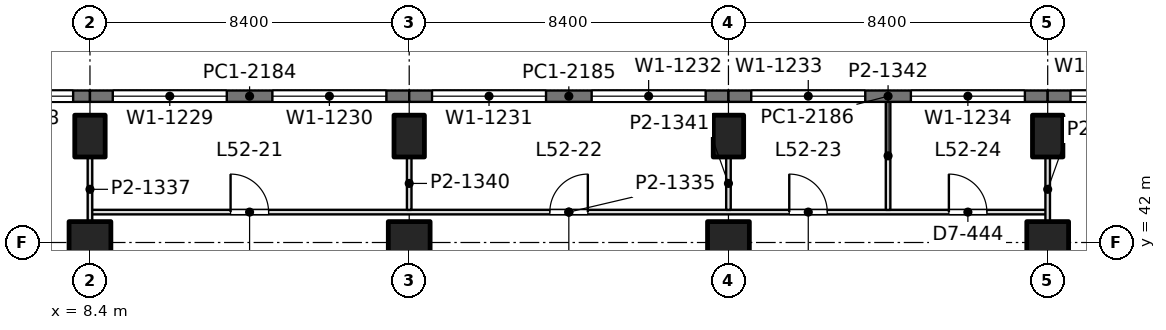
"""IFC4 building model, lengths in metres.
Left out: names, types, materials, properties, quantities, classifications, styles, units other than length and angle.
Written with IfcOpenShell. Run it as: python <this file> out.ifc"""

import sys

from ifc_helpers import new_model, si_unit, direction, frame, frame_2d, origin, origin_2d, place, context, subcontext, project, spatial, rectangle, extrude, element, fill, save


model = new_model("IFC4")
c1 = context("Model", 3, precision=1e-05, world=origin(), true_north=direction((0.0, 1.0)))
c2 = subcontext(c1, "Body", "Model", "MODEL_VIEW")
j1 = project(units=[si_unit("LENGTHUNIT", "METRE"), si_unit("PLANEANGLEUNIT", "RADIAN")], contexts=[c1])
p1 = place(None, origin())
s1 = spatial("IfcSite", under=j1, at=p1, CompositionType="ELEMENT")
p2 = place(p1, origin())
s2 = spatial("IfcBuilding", under=s1, at=p2, CompositionType="ELEMENT")
p3 = place(p2, frame((0.0, 0.0, 228.0)))
s3 = spatial("IfcBuildingStorey", under=s2, at=p3, CompositionType="ELEMENT", Elevation=228.0)
p4 = place(p3, frame((8.4, 42.0, 0.0), z_axis=(0.0, 0.0, 1.0), x_axis=(1.0, 0.0, 0.0)))
e1 = element("IfcColumn", 1, at=p4, inside=s3, PredefinedType="COLUMN", context=c2, shape_type="SweptSolid", body=[
    extrude(rectangle(XDim=1.1, YDim=1.1, at=origin_2d()), origin(), (0.0, 0.0, 1.0), 4.2),
])
p5 = place(p3, frame((8.4, 44.8, 0.0), z_axis=(0.0, 0.0, 1.0), x_axis=(1.0, 0.0, 0.0)))
e2 = element("IfcColumn", 2, at=p5, inside=s3, PredefinedType="COLUMN", context=c2, shape_type="SweptSolid", body=[
    extrude(rectangle(XDim=0.8, YDim=1.1, at=origin_2d()), origin(), (0.0, 0.0, 1.0), 4.2),
])
p6 = place(p3, frame((16.8, 42.0, 0.0), z_axis=(0.0, 0.0, 1.0), x_axis=(1.0, 0.0, 0.0)))
e3 = element("IfcColumn", 3, at=p6, inside=s3, PredefinedType="COLUMN", context=c2, shape_type="SweptSolid", body=[
    extrude(rectangle(XDim=1.1, YDim=1.1, at=origin_2d()), origin(), (0.0, 0.0, 1.0), 4.2),
])
p7 = place(p3, frame((16.8, 44.8, 0.0), z_axis=(0.0, 0.0, 1.0), x_axis=(1.0, 0.0, 0.0)))
e4 = element("IfcColumn", 4, at=p7, inside=s3, PredefinedType="COLUMN", context=c2, shape_type="SweptSolid", body=[
    extrude(rectangle(XDim=0.8, YDim=1.1, at=origin_2d()), origin(), (0.0, 0.0, 1.0), 4.2),
])
p8 = place(p3, frame((25.2, 42.0, 0.0), z_axis=(0.0, 0.0, 1.0), x_axis=(1.0, 0.0, 0.0)))
e5 = element("IfcColumn", 5, at=p8, inside=s3, PredefinedType="COLUMN", context=c2, shape_type="SweptSolid", body=[
    extrude(rectangle(XDim=1.1, YDim=1.1, at=origin_2d()), origin(), (0.0, 0.0, 1.0), 4.2),
])
p9 = place(p3, frame((25.2, 44.8, 0.0), z_axis=(0.0, 0.0, 1.0), x_axis=(1.0, 0.0, 0.0)))
e6 = element("IfcColumn", 6, at=p9, inside=s3, PredefinedType="COLUMN", context=c2, shape_type="SweptSolid", body=[
    extrude(rectangle(XDim=0.8, YDim=1.1, at=origin_2d()), origin(), (0.0, 0.0, 1.0), 4.2),
])
p10 = place(p3, frame((33.6, 42.0, 0.0), z_axis=(0.0, 0.0, 1.0), x_axis=(1.0, 0.0, 0.0)))
e7 = element("IfcColumn", 7, at=p10, inside=s3, PredefinedType="COLUMN", context=c2, shape_type="SweptSolid", body=[
    extrude(rectangle(XDim=1.1, YDim=1.1, at=origin_2d()), origin(), (0.0, 0.0, 1.0), 4.2),
])
p11 = place(p3, frame((33.6, 44.8, 0.0), z_axis=(0.0, 0.0, 1.0), x_axis=(1.0, 0.0, 0.0)))
e8 = element("IfcColumn", 8, at=p11, inside=s3, PredefinedType="COLUMN", context=c2, shape_type="SweptSolid", body=[
    extrude(rectangle(XDim=0.8, YDim=1.1, at=origin_2d()), origin(), (0.0, 0.0, 1.0), 4.2),
])
p12 = place(p3, frame((0.315, 45.85, 0.0), z_axis=(0.0, 0.0, 1.0), x_axis=(1.0, 0.0, 0.0)))
e9 = element("IfcWall", 9, at=p12, inside=s3, PredefinedType="SOLIDWALL", context=c2, shape_type="SweptSolid", body=[
    extrude(rectangle(XDim=8.085, YDim=0.3, at=frame_2d((4.042, 0.0))), origin(), (0.0, 0.0, 1.0), 4.05),
])
p13 = place(p12, frame((0.443, 0.0, 0.9)))
e10 = element("IfcOpeningElement", 10, at=p13, cuts=e9, PredefinedType="OPENING", context=c2, shape_type="SweptSolid", body=[
    extrude(rectangle(XDim=3.0, YDim=1.9, at=frame_2d((1.5, 0.95))), frame((0.0, 0.16, 0.0), z_axis=(0.0, -1.0, 0.0), x_axis=(1.0, 0.0, 0.0)), (0.0, 0.0, 1.0), 0.32),
])
p14 = place(p12, frame((4.643, 0.0, 0.9)))
e11 = element("IfcOpeningElement", 11, at=p14, cuts=e9, PredefinedType="OPENING", context=c2, shape_type="SweptSolid", body=[
    extrude(rectangle(XDim=3.0, YDim=1.9, at=frame_2d((1.5, 0.95))), frame((0.0, 0.16, 0.0), z_axis=(0.0, -1.0, 0.0), x_axis=(1.0, 0.0, 0.0)), (0.0, 0.0, 1.0), 0.32),
])
p15 = place(p3, frame((8.4, 45.85, 0.0), z_axis=(0.0, 0.0, 1.0), x_axis=(1.0, 0.0, 0.0)))
e12 = element("IfcWall", 12, at=p15, inside=s3, PredefinedType="SOLIDWALL", context=c2, shape_type="SweptSolid", body=[
    extrude(rectangle(XDim=8.4, YDim=0.3, at=frame_2d((4.2, 0.0))), origin(), (0.0, 0.0, 1.0), 4.05),
])
p16 = place(p15, frame((0.6, 0.0, 0.9)))
e13 = element("IfcOpeningElement", 13, at=p16, cuts=e12, PredefinedType="OPENING", context=c2, shape_type="SweptSolid", body=[
    extrude(rectangle(XDim=3.0, YDim=1.9, at=frame_2d((1.5, 0.95))), frame((0.0, 0.16, 0.0), z_axis=(0.0, -1.0, 0.0), x_axis=(1.0, 0.0, 0.0)), (0.0, 0.0, 1.0), 0.32),
])
p17 = place(p15, frame((4.8, 0.0, 0.9)))
e14 = element("IfcOpeningElement", 14, at=p17, cuts=e12, PredefinedType="OPENING", context=c2, shape_type="SweptSolid", body=[
    extrude(rectangle(XDim=3.0, YDim=1.9, at=frame_2d((1.5, 0.95))), frame((0.0, 0.16, 0.0), z_axis=(0.0, -1.0, 0.0), x_axis=(1.0, 0.0, 0.0)), (0.0, 0.0, 1.0), 0.32),
])
p18 = place(p3, frame((16.8, 45.85, 0.0), z_axis=(0.0, 0.0, 1.0), x_axis=(1.0, 0.0, 0.0)))
e15 = element("IfcWall", 15, at=p18, inside=s3, PredefinedType="SOLIDWALL", context=c2, shape_type="SweptSolid", body=[
    extrude(rectangle(XDim=8.4, YDim=0.3, at=frame_2d((4.2, 0.0))), origin(), (0.0, 0.0, 1.0), 4.05),
])
p19 = place(p18, frame((0.6, 0.0, 0.9)))
e16 = element("IfcOpeningElement", 16, at=p19, cuts=e15, PredefinedType="OPENING", context=c2, shape_type="SweptSolid", body=[
    extrude(rectangle(XDim=3.0, YDim=1.9, at=frame_2d((1.5, 0.95))), frame((0.0, 0.16, 0.0), z_axis=(0.0, -1.0, 0.0), x_axis=(1.0, 0.0, 0.0)), (0.0, 0.0, 1.0), 0.32),
])
p20 = place(p18, frame((4.8, 0.0, 0.9)))
e17 = element("IfcOpeningElement", 17, at=p20, cuts=e15, PredefinedType="OPENING", context=c2, shape_type="SweptSolid", body=[
    extrude(rectangle(XDim=3.0, YDim=1.9, at=frame_2d((1.5, 0.95))), frame((0.0, 0.16, 0.0), z_axis=(0.0, -1.0, 0.0), x_axis=(1.0, 0.0, 0.0)), (0.0, 0.0, 1.0), 0.32),
])
p21 = place(p3, frame((25.2, 45.85, 0.0), z_axis=(0.0, 0.0, 1.0), x_axis=(1.0, 0.0, 0.0)))
e18 = element("IfcWall", 18, at=p21, inside=s3, PredefinedType="SOLIDWALL", context=c2, shape_type="SweptSolid", body=[
    extrude(rectangle(XDim=8.4, YDim=0.3, at=frame_2d((4.2, 0.0))), origin(), (0.0, 0.0, 1.0), 4.05),
])
p22 = place(p21, frame((0.6, 0.0, 0.9)))
e19 = element("IfcOpeningElement", 19, at=p22, cuts=e18, PredefinedType="OPENING", context=c2, shape_type="SweptSolid", body=[
    extrude(rectangle(XDim=3.0, YDim=1.9, at=frame_2d((1.5, 0.95))), frame((0.0, 0.16, 0.0), z_axis=(0.0, -1.0, 0.0), x_axis=(1.0, 0.0, 0.0)), (0.0, 0.0, 1.0), 0.32),
])
p23 = place(p21, frame((4.8, 0.0, 0.9)))
e20 = element("IfcOpeningElement", 20, at=p23, cuts=e18, PredefinedType="OPENING", context=c2, shape_type="SweptSolid", body=[
    extrude(rectangle(XDim=3.0, YDim=1.9, at=frame_2d((1.5, 0.95))), frame((0.0, 0.16, 0.0), z_axis=(0.0, -1.0, 0.0), x_axis=(1.0, 0.0, 0.0)), (0.0, 0.0, 1.0), 0.32),
])
p24 = place(p3, frame((33.6, 45.85, 0.0), z_axis=(0.0, 0.0, 1.0), x_axis=(1.0, 0.0, 0.0)))
e21 = element("IfcWall", 21, at=p24, inside=s3, PredefinedType="SOLIDWALL", context=c2, shape_type="SweptSolid", body=[
    extrude(rectangle(XDim=8.4, YDim=0.3, at=frame_2d((4.2, 0.0))), origin(), (0.0, 0.0, 1.0), 4.05),
])
p25 = place(p24, frame((0.6, 0.0, 0.9)))
e22 = element("IfcOpeningElement", 22, at=p25, cuts=e21, PredefinedType="OPENING", context=c2, shape_type="SweptSolid", body=[
    extrude(rectangle(XDim=3.0, YDim=1.9, at=frame_2d((1.5, 0.95))), frame((0.0, 0.16, 0.0), z_axis=(0.0, -1.0, 0.0), x_axis=(1.0, 0.0, 0.0)), (0.0, 0.0, 1.0), 0.32),
])
p26 = place(p24, frame((4.8, 0.0, 0.9)))
e23 = element("IfcOpeningElement", 23, at=p26, cuts=e21, PredefinedType="OPENING", context=c2, shape_type="SweptSolid", body=[
    extrude(rectangle(XDim=3.0, YDim=1.9, at=frame_2d((1.5, 0.95))), frame((0.0, 0.16, 0.0), z_axis=(0.0, -1.0, 0.0), x_axis=(1.0, 0.0, 0.0)), (0.0, 0.0, 1.0), 0.32),
])
p27 = place(p3, frame((8.4, 42.8, 0.0), z_axis=(0.0, 0.0, 1.0), x_axis=(1.0, 0.0, 0.0)))
e24 = element("IfcWall", 24, at=p27, inside=s3, PredefinedType="PARTITIONING", context=c2, shape_type="SweptSolid", body=[
    extrude(rectangle(XDim=25.2, YDim=0.12, at=frame_2d((12.6, 0.0))), origin(), (0.0, 0.0, 1.0), 3.69),
])
p28 = place(p27, frame((3.7, 0.0, 0.0)))
e25 = element("IfcOpeningElement", 25, at=p28, cuts=e24, PredefinedType="OPENING", context=c2, shape_type="SweptSolid", body=[
    extrude(rectangle(XDim=1.0, YDim=2.4, at=frame_2d((0.5, 1.2))), frame((0.0, 0.07, 0.0), z_axis=(0.0, -1.0, 0.0), x_axis=(1.0, 0.0, 0.0)), (0.0, 0.0, 1.0), 0.14),
])
p29 = place(p27, frame((12.1, 0.0, 0.0)))
e26 = element("IfcOpeningElement", 26, at=p29, cuts=e24, PredefinedType="OPENING", context=c2, shape_type="SweptSolid", body=[
    extrude(rectangle(XDim=1.0, YDim=2.4, at=frame_2d((0.5, 1.2))), frame((0.0, 0.07, 0.0), z_axis=(0.0, -1.0, 0.0), x_axis=(1.0, 0.0, 0.0)), (0.0, 0.0, 1.0), 0.14),
])
p30 = place(p27, frame((18.4, 0.0, 0.0)))
e27 = element("IfcOpeningElement", 27, at=p30, cuts=e24, PredefinedType="OPENING", context=c2, shape_type="SweptSolid", body=[
    extrude(rectangle(XDim=1.0, YDim=2.4, at=frame_2d((0.5, 1.2))), frame((0.0, 0.07, 0.0), z_axis=(0.0, -1.0, 0.0), x_axis=(1.0, 0.0, 0.0)), (0.0, 0.0, 1.0), 0.14),
])
p31 = place(p27, frame((22.6, 0.0, 0.0)))
e28 = element("IfcOpeningElement", 28, at=p31, cuts=e24, PredefinedType="OPENING", context=c2, shape_type="SweptSolid", body=[
    extrude(rectangle(XDim=1.0, YDim=2.4, at=frame_2d((0.5, 1.2))), frame((0.0, 0.07, 0.0), z_axis=(0.0, -1.0, 0.0), x_axis=(1.0, 0.0, 0.0)), (0.0, 0.0, 1.0), 0.14),
])
p32 = place(p3, frame((8.4, 42.548, 0.0), z_axis=(0.0, 0.0, 1.0), x_axis=(0.0, 1.0, 0.0)))
e29 = element("IfcWall", 29, at=p32, inside=s3, PredefinedType="PARTITIONING", context=c2, shape_type="SweptSolid", body=[
    extrude(rectangle(XDim=1.703, YDim=0.12, at=frame_2d((0.852, 0.0))), origin(), (0.0, 0.0, 1.0), 3.69),
])
for number, where, z_axis, x_axis in (
    (30, (16.8, 42.858, 0.0), (0.0, 0.0, 1.0), (0.0, 1.0, 0.0)),
    (31, (25.2, 42.858, 0.0), (0.0, 0.0, 1.0), (0.0, 1.0, 0.0)),
):
    element("IfcWall", number, at=place(p3, frame(where, z_axis=z_axis, x_axis=x_axis)), inside=s3, PredefinedType="PARTITIONING", context=c2, shape_type="SweptSolid", body=[
        extrude(rectangle(XDim=1.393, YDim=0.12, at=frame_2d((0.697, 0.0))), origin(), (0.0, 0.0, 1.0), 3.69),
    ])
p33 = place(p3, frame((29.4, 42.858, 0.0), z_axis=(0.0, 0.0, 1.0), x_axis=(0.0, 1.0, 0.0)))
e32 = element("IfcWall", 32, at=p33, inside=s3, PredefinedType="PARTITIONING", context=c2, shape_type="SweptSolid", body=[
    extrude(rectangle(XDim=2.844, YDim=0.12, at=frame_2d((1.422, 0.0))), origin(), (0.0, 0.0, 1.0), 3.56),
])
p34 = place(p3, frame((33.6, 42.548, 0.0), z_axis=(0.0, 0.0, 1.0), x_axis=(0.0, 1.0, 0.0)))
e33 = element("IfcWall", 33, at=p34, inside=s3, PredefinedType="PARTITIONING", context=c2, shape_type="SweptSolid", body=[
    extrude(rectangle(XDim=1.703, YDim=0.12, at=frame_2d((0.852, 0.0))), origin(), (0.0, 0.0, 1.0), 3.69),
])
p35 = place(p14, origin())
e34 = element("IfcWindow", 34, at=p35, inside=s3, PartitioningType="SINGLE_PANEL", PredefinedType="WINDOW", context=c2, shape_type="SweptSolid", body=[
    extrude(rectangle(XDim=3.0, YDim=1.9, at=frame_2d((1.5, 0.95))), frame((0.0, 0.03, 0.0), z_axis=(0.0, -1.0, 0.0), x_axis=(1.0, 0.0, 0.0)), (0.0, 0.0, 1.0), 0.06),
])
fill(e11, e34)
p36 = place(p16, origin())
e35 = element("IfcWindow", 35, at=p36, inside=s3, PartitioningType="SINGLE_PANEL", PredefinedType="WINDOW", context=c2, shape_type="SweptSolid", body=[
    extrude(rectangle(XDim=3.0, YDim=1.9, at=frame_2d((1.5, 0.95))), frame((0.0, 0.03, 0.0), z_axis=(0.0, -1.0, 0.0), x_axis=(1.0, 0.0, 0.0)), (0.0, 0.0, 1.0), 0.06),
])
fill(e13, e35)
p37 = place(p17, origin())
e36 = element("IfcWindow", 36, at=p37, inside=s3, PartitioningType="SINGLE_PANEL", PredefinedType="WINDOW", context=c2, shape_type="SweptSolid", body=[
    extrude(rectangle(XDim=3.0, YDim=1.9, at=frame_2d((1.5, 0.95))), frame((0.0, 0.03, 0.0), z_axis=(0.0, -1.0, 0.0), x_axis=(1.0, 0.0, 0.0)), (0.0, 0.0, 1.0), 0.06),
])
fill(e14, e36)
p38 = place(p19, origin())
e37 = element("IfcWindow", 37, at=p38, inside=s3, PartitioningType="SINGLE_PANEL", PredefinedType="WINDOW", context=c2, shape_type="SweptSolid", body=[
    extrude(rectangle(XDim=3.0, YDim=1.9, at=frame_2d((1.5, 0.95))), frame((0.0, 0.03, 0.0), z_axis=(0.0, -1.0, 0.0), x_axis=(1.0, 0.0, 0.0)), (0.0, 0.0, 1.0), 0.06),
])
fill(e16, e37)
p39 = place(p20, origin())
e38 = element("IfcWindow", 38, at=p39, inside=s3, PartitioningType="SINGLE_PANEL", PredefinedType="WINDOW", context=c2, shape_type="SweptSolid", body=[
    extrude(rectangle(XDim=3.0, YDim=1.9, at=frame_2d((1.5, 0.95))), frame((0.0, 0.03, 0.0), z_axis=(0.0, -1.0, 0.0), x_axis=(1.0, 0.0, 0.0)), (0.0, 0.0, 1.0), 0.06),
])
fill(e17, e38)
p40 = place(p22, origin())
e39 = element("IfcWindow", 39, at=p40, inside=s3, PartitioningType="SINGLE_PANEL", PredefinedType="WINDOW", context=c2, shape_type="SweptSolid", body=[
    extrude(rectangle(XDim=3.0, YDim=1.9, at=frame_2d((1.5, 0.95))), frame((0.0, 0.03, 0.0), z_axis=(0.0, -1.0, 0.0), x_axis=(1.0, 0.0, 0.0)), (0.0, 0.0, 1.0), 0.06),
])
fill(e19, e39)
p41 = place(p23, origin())
e40 = element("IfcWindow", 40, at=p41, inside=s3, PartitioningType="SINGLE_PANEL", PredefinedType="WINDOW", context=c2, shape_type="SweptSolid", body=[
    extrude(rectangle(XDim=3.0, YDim=1.9, at=frame_2d((1.5, 0.95))), frame((0.0, 0.03, 0.0), z_axis=(0.0, -1.0, 0.0), x_axis=(1.0, 0.0, 0.0)), (0.0, 0.0, 1.0), 0.06),
])
fill(e20, e40)
p42 = place(p25, origin())
e41 = element("IfcWindow", 41, at=p42, inside=s3, PartitioningType="SINGLE_PANEL", PredefinedType="WINDOW", context=c2, shape_type="SweptSolid", body=[
    extrude(rectangle(XDim=3.0, YDim=1.9, at=frame_2d((1.5, 0.95))), frame((0.0, 0.03, 0.0), z_axis=(0.0, -1.0, 0.0), x_axis=(1.0, 0.0, 0.0)), (0.0, 0.0, 1.0), 0.06),
])
fill(e22, e41)
p43 = place(p28, origin())
e42 = element("IfcDoor", 42, at=p43, inside=s3, OperationType="SINGLE_SWING_LEFT", PredefinedType="DOOR", context=c2, shape_type="SweptSolid", body=[
    extrude(rectangle(XDim=1.0, YDim=2.4, at=frame_2d((0.5, 1.2))), frame((0.0, 0.025, 0.0), z_axis=(0.0, -1.0, 0.0), x_axis=(1.0, 0.0, 0.0)), (0.0, 0.0, 1.0), 0.05),
])
fill(e25, e42)
p44 = place(p29, origin())
e43 = element("IfcDoor", 43, at=p44, inside=s3, OperationType="SINGLE_SWING_RIGHT", PredefinedType="DOOR", context=c2, shape_type="SweptSolid", body=[
    extrude(rectangle(XDim=1.0, YDim=2.4, at=frame_2d((0.5, 1.2))), frame((0.0, 0.025, 0.0), z_axis=(0.0, -1.0, 0.0), x_axis=(1.0, 0.0, 0.0)), (0.0, 0.0, 1.0), 0.05),
])
fill(e26, e43)
p45 = place(p30, origin())
e44 = element("IfcDoor", 44, at=p45, inside=s3, OperationType="SINGLE_SWING_LEFT", PredefinedType="DOOR", context=c2, shape_type="SweptSolid", body=[
    extrude(rectangle(XDim=1.0, YDim=2.4, at=frame_2d((0.5, 1.2))), frame((0.0, 0.025, 0.0), z_axis=(0.0, -1.0, 0.0), x_axis=(1.0, 0.0, 0.0)), (0.0, 0.0, 1.0), 0.05),
])
fill(e27, e44)
p46 = place(p31, origin())
e45 = element("IfcDoor", 45, at=p46, inside=s3, OperationType="SINGLE_SWING_LEFT", PredefinedType="DOOR", context=c2, shape_type="SweptSolid", body=[
    extrude(rectangle(XDim=1.0, YDim=2.4, at=frame_2d((0.5, 1.2))), frame((0.0, 0.025, 0.0), z_axis=(0.0, -1.0, 0.0), x_axis=(1.0, 0.0, 0.0)), (0.0, 0.0, 1.0), 0.05),
])
fill(e28, e45)
save(model, sys.argv[1])
